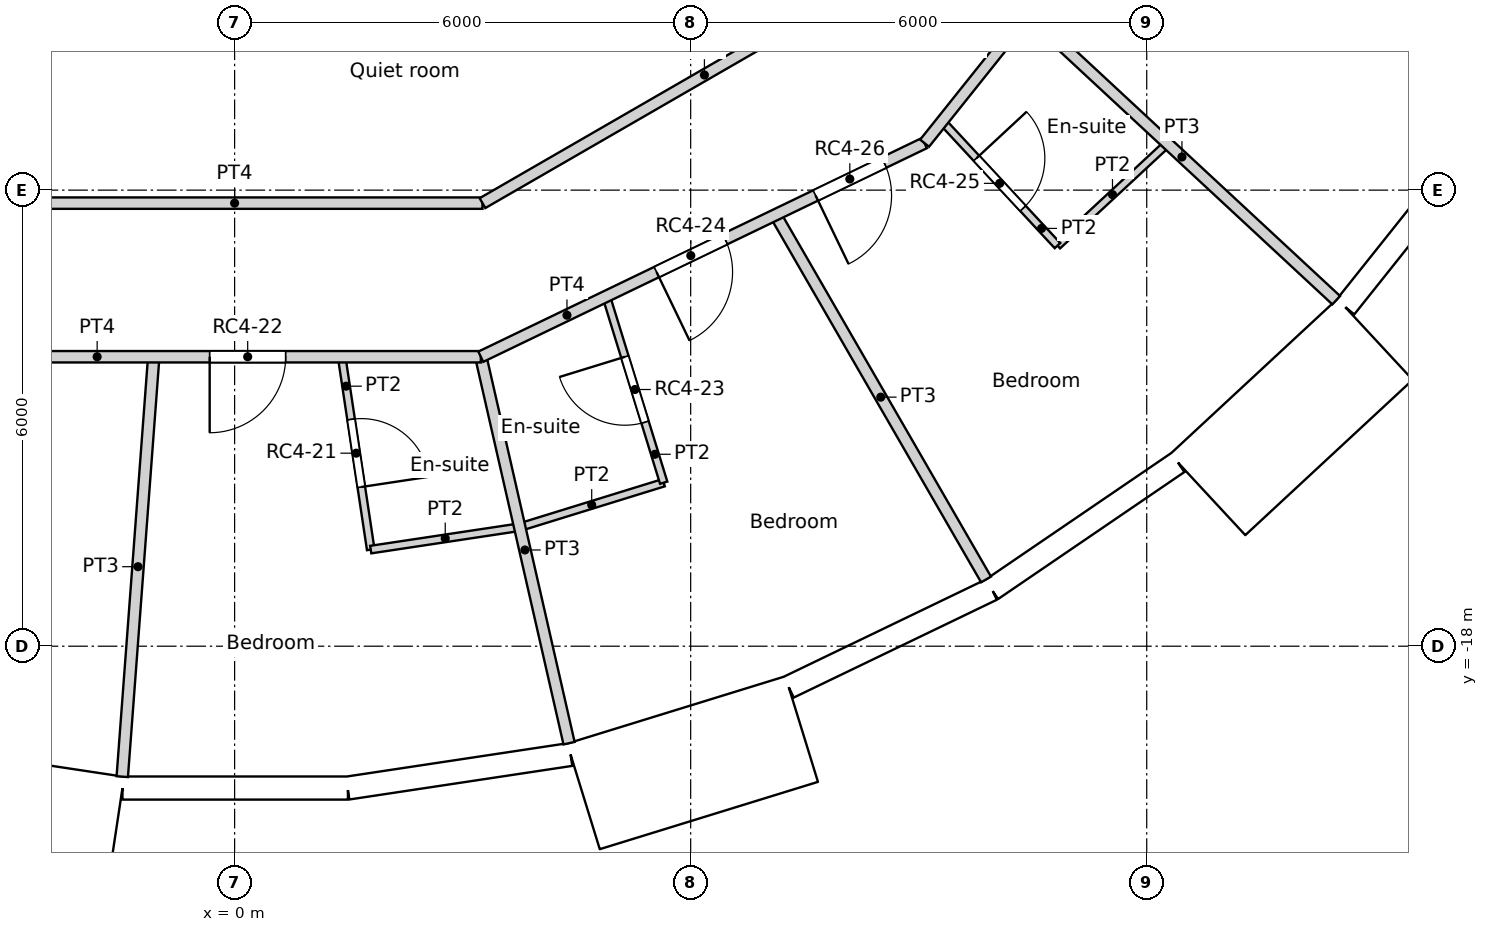
"""IFC4 building model, lengths in metres.
Left out: names, types, materials, properties, quantities, classifications, styles, units other than length and angle.
Written with IfcOpenShell. Run it as: python <this file> out.ifc"""

import sys

from ifc_helpers import new_model, si_unit, direction, frame, frame_2d, origin, origin_2d, place, context, subcontext, project, spatial, rectangle, circle, extrude, element, fill, save


model = new_model("IFC4")
c1 = context("Model", 3, precision=1e-05, world=origin(), true_north=direction((0.0, 1.0)))
c2 = subcontext(c1, "Body", "Model", "MODEL_VIEW")
j1 = project(units=[si_unit("LENGTHUNIT", "METRE"), si_unit("PLANEANGLEUNIT", "RADIAN")], contexts=[c1])
p1 = place(None, origin())
s1 = spatial("IfcSite", under=j1, at=p1, CompositionType="ELEMENT")
p2 = place(p1, origin())
s2 = spatial("IfcBuilding", under=s1, at=p2, CompositionType="ELEMENT")
p3 = place(p2, frame((0.0, 0.0, 263.4)))
s3 = spatial("IfcBuildingStorey", under=s2, at=p3, CompositionType="ELEMENT", Elevation=263.4)
for number, where, z_axis, x_axis in (
    (1, (1.406, -18.77, 0.0), (0.0, 0.0, 1.0), (1.0, 0.0, 0.0)),
    (2, (6.876, -17.521, 0.0), (0.0, 0.0, 1.0), (1.0, 0.0, 0.0)),
    (3, (11.735, -14.716, 0.0), (0.0, 0.0, 1.0), (1.0, 0.0, 0.0)),
    (4, (15.552, -10.603, 0.0), (0.0, 0.0, 1.0), (1.0, 0.0, 0.0)),
):
    element("IfcColumn", number, at=place(p3, frame(where, z_axis=z_axis, x_axis=x_axis)), inside=s3, PredefinedType="COLUMN", context=c2, shape_type="SweptSolid", body=[
        extrude(circle(Radius=0.55, at=origin_2d()), origin(), (0.0, 0.0, 1.0), 3.6),
    ])
p4 = place(p3, frame((-4.53, -19.989, -0.35), z_axis=(0.0, 0.0, 1.0), x_axis=(0.988836445254, -0.149004981587, 0.0)))
e5 = element("IfcWall", 5, at=p4, inside=s3, PredefinedType="ELEMENTEDWALL", context=c2, shape_type="SweptSolid", body=[
    extrude(rectangle(XDim=3.0, YDim=1.45, at=frame_2d((1.5, 0.0))), origin(), (0.0, 0.0, 1.0), 3.6),
])
p5 = place(p4, frame((1.5, 0.0, 1.9)))
e6 = element("IfcOpeningElement", 6, at=p5, cuts=e5, PredefinedType="OPENING", context=c2, shape_type="SweptSolid", body=[
    extrude(circle(Radius=0.9, at=origin_2d()), frame((0.0, 0.735, 0.0), z_axis=(0.0, -1.0, 0.0), x_axis=(1.0, 0.0, 0.0)), (0.0, 0.0, 1.0), 1.47),
])
p6 = place(p3, frame((-1.473, -19.866, 0.0), z_axis=(0.0, 0.0, 1.0), x_axis=(1.0, 0.0, 0.0)))
e7 = element("IfcWall", 7, at=p6, inside=s3, PredefinedType="SOLIDWALL", context=c2, shape_type="SweptSolid", body=[
    extrude(rectangle(XDim=2.962, YDim=0.3, at=frame_2d((1.481, 0.0))), origin(), (0.0, 0.0, 1.0), 3.25),
])
p7 = place(p6, frame((1.481, 0.0, 1.55)))
e8 = element("IfcOpeningElement", 8, at=p7, cuts=e7, PredefinedType="OPENING", context=c2, shape_type="SweptSolid", body=[
    extrude(circle(Radius=0.9, at=origin_2d()), frame((0.0, 0.16, 0.0), z_axis=(0.0, -1.0, 0.0), x_axis=(1.0, 0.0, 0.0)), (0.0, 0.0, 1.0), 0.32),
])
p8 = place(p3, frame((1.489, -19.866, 0.0), z_axis=(0.0, 0.0, 1.0), x_axis=(0.988835775663, 0.149009425104, 0.0)))
e9 = element("IfcWall", 9, at=p8, inside=s3, PredefinedType="SOLIDWALL", context=c2, shape_type="SweptSolid", body=[
    extrude(rectangle(XDim=2.962, YDim=0.3, at=frame_2d((1.481, 0.0))), origin(), (0.0, 0.0, 1.0), 3.25),
])
p9 = place(p8, frame((1.481, 0.0, 1.55)))
e10 = element("IfcOpeningElement", 10, at=p9, cuts=e9, PredefinedType="OPENING", context=c2, shape_type="SweptSolid", body=[
    extrude(circle(Radius=0.9, at=origin_2d()), frame((0.0, 0.16, 0.0), z_axis=(0.0, -1.0, 0.0), x_axis=(1.0, 0.0, 0.0)), (0.0, 0.0, 1.0), 0.32),
])
p10 = place(p3, frame((4.592, -19.975, -0.35), z_axis=(0.0, 0.0, 1.0), x_axis=(0.955571139978, 0.294760574774, 0.0)))
e11 = element("IfcWall", 11, at=p10, inside=s3, PredefinedType="ELEMENTEDWALL", context=c2, shape_type="SweptSolid", body=[
    extrude(rectangle(XDim=3.0, YDim=1.45, at=frame_2d((1.5, 0.0))), origin(), (0.0, 0.0, 1.0), 3.6),
])
p11 = place(p10, frame((1.5, 0.0, 1.9)))
e12 = element("IfcOpeningElement", 12, at=p11, cuts=e11, PredefinedType="OPENING", context=c2, shape_type="SweptSolid", body=[
    extrude(circle(Radius=0.9, at=origin_2d()), frame((0.0, 0.735, 0.0), z_axis=(0.0, -1.0, 0.0), x_axis=(1.0, 0.0, 0.0)), (0.0, 0.0, 1.0), 1.47),
])
p12 = place(p3, frame((7.292, -18.538, 0.0), z_axis=(0.0, 0.0, 1.0), x_axis=(0.90095513435, 0.433912255978, 0.0)))
e13 = element("IfcWall", 13, at=p12, inside=s3, PredefinedType="SOLIDWALL", context=c2, shape_type="SweptSolid", body=[
    extrude(rectangle(XDim=2.962, YDim=0.3, at=frame_2d((1.481, 0.0))), origin(), (0.0, 0.0, 1.0), 3.25),
])
p13 = place(p12, frame((1.481, 0.0, 1.55)))
e14 = element("IfcOpeningElement", 14, at=p13, cuts=e13, PredefinedType="OPENING", context=c2, shape_type="SweptSolid", body=[
    extrude(circle(Radius=0.9, at=origin_2d()), frame((0.0, 0.16, 0.0), z_axis=(0.0, -1.0, 0.0), x_axis=(1.0, 0.0, 0.0)), (0.0, 0.0, 1.0), 0.32),
])
p14 = place(p3, frame((9.961, -17.253, 0.0), z_axis=(0.0, 0.0, 1.0), x_axis=(0.826236061068, 0.563324037646, 0.0)))
e15 = element("IfcWall", 15, at=p14, inside=s3, PredefinedType="SOLIDWALL", context=c2, shape_type="SweptSolid", body=[
    extrude(rectangle(XDim=2.962, YDim=0.3, at=frame_2d((1.481, 0.0))), origin(), (0.0, 0.0, 1.0), 3.25),
])
p15 = place(p14, frame((1.481, 0.0, 1.55)))
e16 = element("IfcOpeningElement", 16, at=p15, cuts=e15, PredefinedType="OPENING", context=c2, shape_type="SweptSolid", body=[
    extrude(circle(Radius=0.9, at=origin_2d()), frame((0.0, 0.16, 0.0), z_axis=(0.0, -1.0, 0.0), x_axis=(1.0, 0.0, 0.0)), (0.0, 0.0, 1.0), 0.32),
])
p16 = place(p3, frame((12.804, -16.005, -0.35), z_axis=(0.0, 0.0, 1.0), x_axis=(0.733022439167, 0.680204457261, 0.0)))
e17 = element("IfcWall", 17, at=p16, inside=s3, PredefinedType="ELEMENTEDWALL", context=c2, shape_type="SweptSolid", body=[
    extrude(rectangle(XDim=3.0, YDim=1.45, at=frame_2d((1.5, 0.0))), origin(), (0.0, 0.0, 1.0), 3.6),
])
p17 = place(p16, frame((1.5, 0.0, 1.9)))
e18 = element("IfcOpeningElement", 18, at=p17, cuts=e17, PredefinedType="OPENING", context=c2, shape_type="SweptSolid", body=[
    extrude(circle(Radius=0.9, at=origin_2d()), frame((0.0, 0.735, 0.0), z_axis=(0.0, -1.0, 0.0), x_axis=(1.0, 0.0, 0.0)), (0.0, 0.0, 1.0), 1.47),
])
p18 = place(p3, frame((14.613, -13.538, 0.0), z_axis=(0.0, 0.0, 1.0), x_axis=(0.623498236992, 0.781824755599, 0.0)))
e19 = element("IfcWall", 19, at=p18, inside=s3, PredefinedType="SOLIDWALL", context=c2, shape_type="SweptSolid", body=[
    extrude(rectangle(XDim=2.962, YDim=0.3, at=frame_2d((1.481, 0.0))), origin(), (0.0, 0.0, 1.0), 3.25),
])
p19 = place(p18, frame((1.481, 0.0, 1.55)))
e20 = element("IfcOpeningElement", 20, at=p19, cuts=e19, PredefinedType="OPENING", context=c2, shape_type="SweptSolid", body=[
    extrude(circle(Radius=0.9, at=origin_2d()), frame((0.0, 0.16, 0.0), z_axis=(0.0, -1.0, 0.0), x_axis=(1.0, 0.0, 0.0)), (0.0, 0.0, 1.0), 0.32),
])
p20 = place(p3, frame((9.078, -11.382, 0.0), z_axis=(0.0, 0.0, 1.0), x_axis=(0.624018330412, 0.781409702595, 0.0)))
e21 = element("IfcWall", 21, at=p20, inside=s3, PredefinedType="PARTITIONING", context=c2, shape_type="SweptSolid", body=[
    extrude(rectangle(XDim=3.301, YDim=0.15, at=frame_2d((1.65, 0.0))), origin(), (0.0, 0.0, 1.0), 3.25),
])
p21 = place(p3, frame((-3.261, -12.171, 0.0), z_axis=(0.0, 0.0, 1.0), x_axis=(1.0, 0.0, 0.0)))
e22 = element("IfcWall", 22, at=p21, inside=s3, PredefinedType="PARTITIONING", context=c2, shape_type="SweptSolid", body=[
    extrude(rectangle(XDim=6.522, YDim=0.15, at=frame_2d((3.261, 0.0))), origin(), (0.0, 0.0, 1.0), 3.25),
])
p22 = place(p3, frame((3.261, -12.171, 0.0), z_axis=(0.0, 0.0, 1.0), x_axis=(0.866066809554, 0.499928276245, 0.0)))
e23 = element("IfcWall", 23, at=p22, inside=s3, PredefinedType="PARTITIONING", context=c2, shape_type="SweptSolid", body=[
    extrude(rectangle(XDim=6.743, YDim=0.15, at=frame_2d((3.371, 0.0))), origin(), (0.0, 0.0, 1.0), 3.25),
])
p23 = place(p3, frame((-3.239, -14.192, 0.0), z_axis=(0.0, 0.0, 1.0), x_axis=(1.0, 0.0, 0.0)))
e24 = element("IfcWall", 24, at=p23, inside=s3, PredefinedType="PARTITIONING", context=c2, shape_type="SweptSolid", body=[
    extrude(rectangle(XDim=6.478, YDim=0.15, at=frame_2d((3.239, 0.0))), origin(), (0.0, 0.0, 1.0), 3.25),
])
p24 = place(p23, frame((2.911, 0.0, 0.0)))
e25 = element("IfcOpeningElement", 25, at=p24, cuts=e24, PredefinedType="OPENING", context=c2, shape_type="SweptSolid", body=[
    extrude(rectangle(XDim=1.0, YDim=2.1, at=frame_2d((0.5, 1.05))), frame((0.0, 0.075, 0.0), z_axis=(0.0, -1.0, 0.0), x_axis=(1.0, 0.0, 0.0)), (0.0, 0.0, 1.0), 0.15),
])
p25 = place(p3, frame((3.239, -14.192, 0.0), z_axis=(0.0, 0.0, 1.0), x_axis=(0.900939467372, 0.433944784657, 0.0)))
e26 = element("IfcWall", 26, at=p25, inside=s3, PredefinedType="PARTITIONING", context=c2, shape_type="SweptSolid", body=[
    extrude(rectangle(XDim=6.479, YDim=0.15, at=frame_2d((3.239, 0.0))), origin(), (0.0, 0.0, 1.0), 3.25),
])
p26 = place(p25, frame((2.567, 0.0, 0.0)))
e27 = element("IfcOpeningElement", 27, at=p26, cuts=e26, PredefinedType="OPENING", context=c2, shape_type="SweptSolid", body=[
    extrude(rectangle(XDim=1.0, YDim=2.1, at=frame_2d((0.5, 1.05))), frame((0.0, 0.075, 0.0), z_axis=(0.0, -1.0, 0.0), x_axis=(1.0, 0.0, 0.0)), (0.0, 0.0, 1.0), 0.15),
])
p27 = place(p25, frame((4.889, 0.0, 0.0)))
e28 = element("IfcOpeningElement", 28, at=p27, cuts=e26, PredefinedType="OPENING", context=c2, shape_type="SweptSolid", body=[
    extrude(rectangle(XDim=1.0, YDim=2.1, at=frame_2d((0.5, 1.05))), frame((0.0, 0.075, 0.0), z_axis=(0.0, -1.0, 0.0), x_axis=(1.0, 0.0, 0.0)), (0.0, 0.0, 1.0), 0.15),
])
p28 = place(p3, frame((-1.478, -19.716, 0.0), z_axis=(0.0, 0.0, 1.0), x_axis=(0.074745027699, 0.997202677912, 0.0)))
e29 = element("IfcWall", 29, at=p28, inside=s3, PredefinedType="PARTITIONING", context=c2, shape_type="SweptSolid", body=[
    extrude(rectangle(XDim=5.54, YDim=0.15, at=frame_2d((2.77, 0.0))), origin(), (0.0, 0.0, 1.0), 3.25),
])
p29 = place(p3, frame((1.408, -14.192, 0.0), z_axis=(0.0, 0.0, 1.0), x_axis=(0.149289553133, -0.988793522089, 0.0)))
e30 = element("IfcWall", 30, at=p29, inside=s3, PredefinedType="PARTITIONING", context=c2, shape_type="SweptSolid", body=[
    extrude(rectangle(XDim=2.566, YDim=0.1, at=frame_2d((1.283, 0.0))), origin(), (0.0, 0.0, 1.0), 3.25),
])
p30 = place(p29, frame((0.833, 0.0, 0.0)))
e31 = element("IfcOpeningElement", 31, at=p30, cuts=e30, PredefinedType="OPENING", context=c2, shape_type="SweptSolid", body=[
    extrude(rectangle(XDim=0.9, YDim=2.04, at=frame_2d((0.45, 1.02))), frame((0.0, 0.05, 0.0), z_axis=(0.0, -1.0, 0.0), x_axis=(1.0, 0.0, 0.0)), (0.0, 0.0, 1.0), 0.1),
])
p31 = place(p3, frame((1.791, -16.729, 0.0), z_axis=(0.0, 0.0, 1.0), x_axis=(0.988867580828, 0.148798210967, 0.0)))
e32 = element("IfcWall", 32, at=p31, inside=s3, PredefinedType="PARTITIONING", context=c2, shape_type="SweptSolid", body=[
    extrude(rectangle(XDim=1.982, YDim=0.1, at=frame_2d((0.991, 0.0))), origin(), (0.0, 0.0, 1.0), 3.25),
])
p32 = place(p3, frame((3.239, -14.192, 0.0), z_axis=(0.0, 0.0, 1.0), x_axis=(0.222612505682, -0.974907007008, 0.0)))
e33 = element("IfcWall", 33, at=p32, inside=s3, PredefinedType="PARTITIONING", context=c2, shape_type="SweptSolid", body=[
    extrude(rectangle(XDim=5.215, YDim=0.15, at=frame_2d((2.607, 0.0))), origin(), (0.0, 0.0, 1.0), 3.25),
])
p33 = place(p3, frame((3.751, -16.434, 0.0), z_axis=(0.0, 0.0, 1.0), x_axis=(0.955469584731, 0.295089601059, 0.0)))
e34 = element("IfcWall", 34, at=p33, inside=s3, PredefinedType="PARTITIONING", context=c2, shape_type="SweptSolid", body=[
    extrude(rectangle(XDim=1.982, YDim=0.1, at=frame_2d((0.991, 0.0))), origin(), (0.0, 0.0, 1.0), 3.25),
])
p34 = place(p3, frame((4.889, -13.397, 0.0), z_axis=(0.0, 0.0, 1.0), x_axis=(0.294654076104, -0.955603984627, 0.0)))
e35 = element("IfcWall", 35, at=p34, inside=s3, PredefinedType="PARTITIONING", context=c2, shape_type="SweptSolid", body=[
    extrude(rectangle(XDim=2.566, YDim=0.1, at=frame_2d((1.283, 0.0))), origin(), (0.0, 0.0, 1.0), 3.25),
])
p35 = place(p34, frame((0.833, 0.0, 0.0)))
e36 = element("IfcOpeningElement", 36, at=p35, cuts=e35, PredefinedType="OPENING", context=c2, shape_type="SweptSolid", body=[
    extrude(rectangle(XDim=0.9, YDim=2.04, at=frame_2d((0.45, 1.02))), frame((0.0, 0.05, 0.0), z_axis=(0.0, -1.0, 0.0), x_axis=(1.0, 0.0, 0.0)), (0.0, 0.0, 1.0), 0.1),
])
p36 = place(p3, frame((7.116, -12.325, 0.0), z_axis=(0.0, 0.0, 1.0), x_axis=(0.500054359786, -0.865994016873, 0.0)))
e37 = element("IfcWall", 37, at=p36, inside=s3, PredefinedType="PARTITIONING", context=c2, shape_type="SweptSolid", body=[
    extrude(rectangle(XDim=5.54, YDim=0.15, at=frame_2d((2.77, 0.0))), origin(), (0.0, 0.0, 1.0), 3.25),
])
p37 = place(p3, frame((9.306, -11.092, 0.0), z_axis=(0.0, 0.0, 1.0), x_axis=(0.680228963773, -0.732999697711, 0.0)))
e38 = element("IfcWall", 38, at=p37, inside=s3, PredefinedType="PARTITIONING", context=c2, shape_type="SweptSolid", body=[
    extrude(rectangle(XDim=2.235, YDim=0.1, at=frame_2d((1.117, 0.0))), origin(), (0.0, 0.0, 1.0), 3.25),
])
p38 = place(p37, frame((0.667, 0.0, 0.0)))
e39 = element("IfcOpeningElement", 39, at=p38, cuts=e38, PredefinedType="OPENING", context=c2, shape_type="SweptSolid", body=[
    extrude(rectangle(XDim=0.9, YDim=2.04, at=frame_2d((0.45, 1.02))), frame((0.0, 0.05, 0.0), z_axis=(0.0, -1.0, 0.0), x_axis=(1.0, 0.0, 0.0)), (0.0, 0.0, 1.0), 0.1),
])
p39 = place(p3, frame((10.826, -12.73, 0.0), z_axis=(0.0, 0.0, 1.0), x_axis=(0.732956436026, 0.680275578636, 0.0)))
e40 = element("IfcWall", 40, at=p39, inside=s3, PredefinedType="PARTITIONING", context=c2, shape_type="SweptSolid", body=[
    extrude(rectangle(XDim=1.974, YDim=0.1, at=frame_2d((0.987, 0.0))), origin(), (0.0, 0.0, 1.0), 3.25),
])
p40 = place(p3, frame((10.434, -9.679, 0.0), z_axis=(0.0, 0.0, 1.0), x_axis=(0.732845293448, -0.680395308531, 0.0)))
e41 = element("IfcWall", 41, at=p40, inside=s3, PredefinedType="PARTITIONING", context=c2, shape_type="SweptSolid", body=[
    extrude(rectangle(XDim=5.539, YDim=0.15, at=frame_2d((2.77, 0.0))), origin(), (0.0, 0.0, 1.0), 3.25),
])
p41 = place(p5, origin())
e42 = element("IfcWindow", 42, at=p41, inside=s3, PartitioningType="SINGLE_PANEL", PredefinedType="WINDOW", context=c2, shape_type="SweptSolid", body=[
    extrude(circle(Radius=0.9, at=origin_2d()), frame((0.0, 0.695, 0.0), z_axis=(0.0, -1.0, 0.0), x_axis=(1.0, 0.0, 0.0)), (0.0, 0.0, 1.0), 0.1),
])
fill(e6, e42)
p42 = place(p7, origin())
e43 = element("IfcWindow", 43, at=p42, inside=s3, PartitioningType="SINGLE_PANEL", PredefinedType="WINDOW", context=c2, shape_type="SweptSolid", body=[
    extrude(circle(Radius=0.9, at=origin_2d()), frame((0.0, 0.12, 0.0), z_axis=(0.0, -1.0, 0.0), x_axis=(1.0, 0.0, 0.0)), (0.0, 0.0, 1.0), 0.1),
])
fill(e8, e43)
p43 = place(p9, origin())
e44 = element("IfcWindow", 44, at=p43, inside=s3, PartitioningType="SINGLE_PANEL", PredefinedType="WINDOW", context=c2, shape_type="SweptSolid", body=[
    extrude(circle(Radius=0.9, at=origin_2d()), frame((0.0, 0.12, 0.0), z_axis=(0.0, -1.0, 0.0), x_axis=(1.0, 0.0, 0.0)), (0.0, 0.0, 1.0), 0.1),
])
fill(e10, e44)
p44 = place(p11, origin())
e45 = element("IfcWindow", 45, at=p44, inside=s3, PartitioningType="SINGLE_PANEL", PredefinedType="WINDOW", context=c2, shape_type="SweptSolid", body=[
    extrude(circle(Radius=0.9, at=origin_2d()), frame((0.0, 0.695, 0.0), z_axis=(0.0, -1.0, 0.0), x_axis=(1.0, 0.0, 0.0)), (0.0, 0.0, 1.0), 0.1),
])
fill(e12, e45)
p45 = place(p13, origin())
e46 = element("IfcWindow", 46, at=p45, inside=s3, PartitioningType="SINGLE_PANEL", PredefinedType="WINDOW", context=c2, shape_type="SweptSolid", body=[
    extrude(circle(Radius=0.9, at=origin_2d()), frame((0.0, 0.12, 0.0), z_axis=(0.0, -1.0, 0.0), x_axis=(1.0, 0.0, 0.0)), (0.0, 0.0, 1.0), 0.1),
])
fill(e14, e46)
p46 = place(p15, origin())
e47 = element("IfcWindow", 47, at=p46, inside=s3, PartitioningType="SINGLE_PANEL", PredefinedType="WINDOW", context=c2, shape_type="SweptSolid", body=[
    extrude(circle(Radius=0.9, at=origin_2d()), frame((0.0, 0.12, 0.0), z_axis=(0.0, -1.0, 0.0), x_axis=(1.0, 0.0, 0.0)), (0.0, 0.0, 1.0), 0.1),
])
fill(e16, e47)
p47 = place(p17, origin())
e48 = element("IfcWindow", 48, at=p47, inside=s3, PartitioningType="SINGLE_PANEL", PredefinedType="WINDOW", context=c2, shape_type="SweptSolid", body=[
    extrude(circle(Radius=0.9, at=origin_2d()), frame((0.0, 0.695, 0.0), z_axis=(0.0, -1.0, 0.0), x_axis=(1.0, 0.0, 0.0)), (0.0, 0.0, 1.0), 0.1),
])
fill(e18, e48)
p48 = place(p19, origin())
e49 = element("IfcWindow", 49, at=p48, inside=s3, PartitioningType="SINGLE_PANEL", PredefinedType="WINDOW", context=c2, shape_type="SweptSolid", body=[
    extrude(circle(Radius=0.9, at=origin_2d()), frame((0.0, 0.12, 0.0), z_axis=(0.0, -1.0, 0.0), x_axis=(1.0, 0.0, 0.0)), (0.0, 0.0, 1.0), 0.1),
])
fill(e20, e49)
p49 = place(p30, origin())
e50 = element("IfcDoor", 50, at=p49, inside=s3, OperationType="SINGLE_SWING_RIGHT", PredefinedType="DOOR", context=c2, shape_type="SweptSolid", body=[
    extrude(rectangle(XDim=0.9, YDim=2.04, at=frame_2d((0.45, 1.02))), frame((0.0, 0.025, 0.0), z_axis=(0.0, -1.0, 0.0), x_axis=(1.0, 0.0, 0.0)), (0.0, 0.0, 1.0), 0.05),
])
fill(e31, e50)
p50 = place(p24, origin())
e51 = element("IfcDoor", 51, at=p50, inside=s3, OperationType="SINGLE_SWING_RIGHT", PredefinedType="DOOR", context=c2, shape_type="SweptSolid", body=[
    extrude(rectangle(XDim=1.0, YDim=2.1, at=frame_2d((0.5, 1.05))), frame((0.0, 0.025, 0.0), z_axis=(0.0, -1.0, 0.0), x_axis=(1.0, 0.0, 0.0)), (0.0, 0.0, 1.0), 0.05),
])
fill(e25, e51)
p51 = place(p35, origin())
e52 = element("IfcDoor", 52, at=p51, inside=s3, OperationType="SINGLE_SWING_RIGHT", PredefinedType="DOOR", context=c2, shape_type="SweptSolid", body=[
    extrude(rectangle(XDim=0.9, YDim=2.04, at=frame_2d((0.45, 1.02))), frame((0.0, 0.025, 0.0), z_axis=(0.0, -1.0, 0.0), x_axis=(1.0, 0.0, 0.0)), (0.0, 0.0, 1.0), 0.05),
])
fill(e36, e52)
p52 = place(p26, origin())
e53 = element("IfcDoor", 53, at=p52, inside=s3, OperationType="SINGLE_SWING_RIGHT", PredefinedType="DOOR", context=c2, shape_type="SweptSolid", body=[
    extrude(rectangle(XDim=1.0, YDim=2.1, at=frame_2d((0.5, 1.05))), frame((0.0, 0.025, 0.0), z_axis=(0.0, -1.0, 0.0), x_axis=(1.0, 0.0, 0.0)), (0.0, 0.0, 1.0), 0.05),
])
fill(e27, e53)
p53 = place(p38, origin())
e54 = element("IfcDoor", 54, at=p53, inside=s3, OperationType="SINGLE_SWING_LEFT", PredefinedType="DOOR", context=c2, shape_type="SweptSolid", body=[
    extrude(rectangle(XDim=0.9, YDim=2.04, at=frame_2d((0.45, 1.02))), frame((0.0, 0.025, 0.0), z_axis=(0.0, -1.0, 0.0), x_axis=(1.0, 0.0, 0.0)), (0.0, 0.0, 1.0), 0.05),
])
fill(e39, e54)
p54 = place(p27, origin())
e55 = element("IfcDoor", 55, at=p54, inside=s3, OperationType="SINGLE_SWING_RIGHT", PredefinedType="DOOR", context=c2, shape_type="SweptSolid", body=[
    extrude(rectangle(XDim=1.0, YDim=2.1, at=frame_2d((0.5, 1.05))), frame((0.0, 0.025, 0.0), z_axis=(0.0, -1.0, 0.0), x_axis=(1.0, 0.0, 0.0)), (0.0, 0.0, 1.0), 0.05),
])
fill(e28, e55)
save(model, sys.argv[1])
